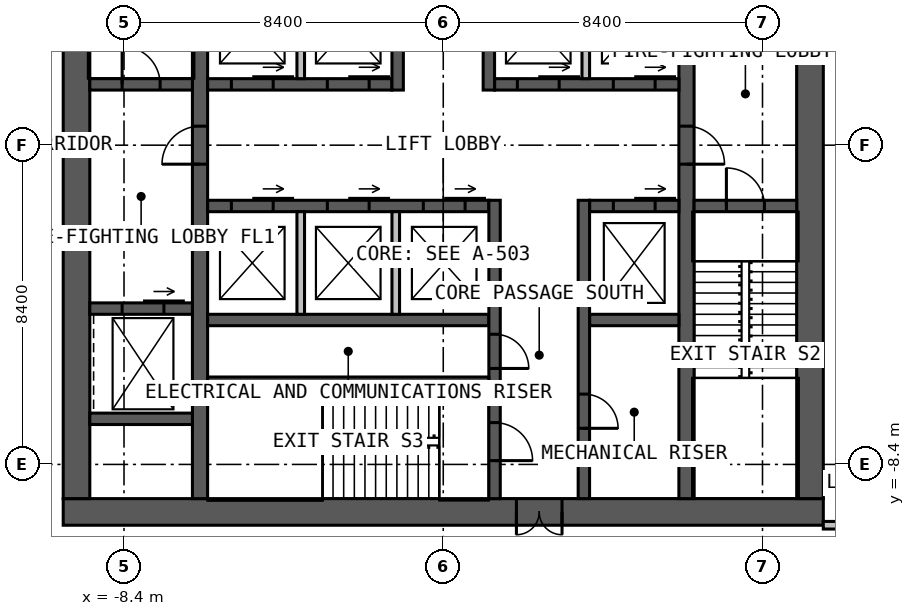
"""IFC4 building model, lengths in metres.
Left out: names, types, materials, properties, quantities, classifications, styles, units other than length and angle.
Written with IfcOpenShell. Run it as: python <this file> out.ifc"""

import sys

from ifc_helpers import new_model, si_unit, direction, frame, frame_2d, origin, place, context, subcontext, project, spatial, rectangle, extrude, element, fill, save


model = new_model("IFC4")
c1 = context("Model", 3, precision=1e-05, world=origin(), true_north=direction((0.0, 1.0)))
c2 = subcontext(c1, "Body", "Model", "MODEL_VIEW")
j1 = project(units=[si_unit("LENGTHUNIT", "METRE"), si_unit("PLANEANGLEUNIT", "RADIAN")], contexts=[c1])
p1 = place(None, origin())
s1 = spatial("IfcSite", under=j1, at=p1, CompositionType="ELEMENT")
p2 = place(p1, origin())
s2 = spatial("IfcBuilding", under=s1, at=p2, CompositionType="ELEMENT")
p3 = place(p2, frame((0.0, 0.0, 90.0)))
s3 = spatial("IfcBuildingStorey", under=s2, at=p3, CompositionType="ELEMENT", Elevation=90.0)
p4 = place(p3, frame((10.0, -9.65, 0.0), z_axis=(0.0, 0.0, 1.0), x_axis=(-1.0, 0.0, 0.0)))
e1 = element("IfcWall", 1, at=p4, inside=s3, PredefinedType="SOLIDWALL", context=c2, shape_type="SweptSolid", body=[
    extrude(rectangle(XDim=20.0, YDim=0.7, at=frame_2d((10.0, 0.0))), origin(), (0.0, 0.0, 1.0), 4.0),
])
p5 = place(p4, frame((6.875, 0.0, 0.0)))
e2 = element("IfcOpeningElement", 2, at=p5, cuts=e1, PredefinedType="OPENING", context=c2, shape_type="SweptSolid", body=[
    extrude(rectangle(XDim=1.2, YDim=2.2, at=frame_2d((0.6, 1.1))), frame((0.0, 0.36, 0.0), z_axis=(0.0, -1.0, 0.0), x_axis=(1.0, 0.0, 0.0)), (0.0, 0.0, 1.0), 0.72),
])
for number, where, z_axis, x_axis in (
    (3, (9.65, -9.3, 0.0), (0.0, 0.0, 1.0), (0.0, 1.0, 0.0)),
    (4, (-9.65, 9.3, 0.0), (0.0, 0.0, 1.0), (0.0, -1.0, 0.0)),
):
    element("IfcWall", number, at=place(p3, frame(where, z_axis=z_axis, x_axis=x_axis)), inside=s3, PredefinedType="SOLIDWALL", context=c2, shape_type="SweptSolid", body=[
        extrude(rectangle(XDim=18.6, YDim=0.7, at=frame_2d((9.3, 0.0))), origin(), (0.0, 0.0, 1.0), 4.0),
    ])
p6 = place(p3, frame((-6.4, -9.3, 0.0), z_axis=(0.0, 0.0, 1.0), x_axis=(0.0, 1.0, 0.0)))
e5 = element("IfcWall", 5, at=p6, inside=s3, PredefinedType="SOLIDWALL", context=c2, shape_type="SweptSolid", body=[
    extrude(rectangle(XDim=18.6, YDim=0.4, at=frame_2d((9.3, 0.0))), origin(), (0.0, 0.0, 1.0), 4.0),
])
p7 = place(p6, frame((8.8, 0.0, 0.0)))
e6 = element("IfcOpeningElement", 6, at=p7, cuts=e5, PredefinedType="OPENING", context=c2, shape_type="SweptSolid", body=[
    extrude(rectangle(XDim=1.0, YDim=2.2, at=frame_2d((0.5, 1.1))), frame((0.0, 0.21, 0.0), z_axis=(0.0, -1.0, 0.0), x_axis=(1.0, 0.0, 0.0)), (0.0, 0.0, 1.0), 0.42),
])
p8 = place(p3, frame((6.4, 9.3, 0.0), z_axis=(0.0, 0.0, 1.0), x_axis=(0.0, -1.0, 0.0)))
e7 = element("IfcWall", 7, at=p8, inside=s3, PredefinedType="SOLIDWALL", context=c2, shape_type="SweptSolid", body=[
    extrude(rectangle(XDim=18.6, YDim=0.4, at=frame_2d((9.3, 0.0))), origin(), (0.0, 0.0, 1.0), 4.0),
])
p9 = place(p8, frame((8.8, 0.0, 0.0)))
e8 = element("IfcOpeningElement", 8, at=p9, cuts=e7, PredefinedType="OPENING", context=c2, shape_type="SweptSolid", body=[
    extrude(rectangle(XDim=1.0, YDim=2.2, at=frame_2d((0.5, 1.1))), frame((0.0, 0.21, 0.0), z_axis=(0.0, -1.0, 0.0), x_axis=(1.0, 0.0, 0.0)), (0.0, 0.0, 1.0), 0.42),
])
p10 = place(p3, frame((-6.2, 1.6, 0.0), z_axis=(0.0, 0.0, 1.0), x_axis=(1.0, 0.0, 0.0)))
e9 = element("IfcWall", 9, at=p10, inside=s3, PredefinedType="SOLIDWALL", context=c2, shape_type="SweptSolid", body=[
    extrude(rectangle(XDim=4.85, YDim=0.3, at=frame_2d((2.425, 0.0))), origin(), (0.0, 0.0, 1.0), 4.0),
])
p11 = place(p10, frame((0.625, 0.0, 0.0)))
e10 = element("IfcOpeningElement", 10, at=p11, cuts=e9, PredefinedType="OPENING", context=c2, shape_type="SweptSolid", body=[
    extrude(rectangle(XDim=1.1, YDim=2.2, at=frame_2d((0.55, 1.1))), frame((0.0, 0.16, 0.0), z_axis=(0.0, -1.0, 0.0), x_axis=(1.0, 0.0, 0.0)), (0.0, 0.0, 1.0), 0.32),
])
p12 = place(p10, frame((3.15, 0.0, 0.0)))
e11 = element("IfcOpeningElement", 11, at=p12, cuts=e9, PredefinedType="OPENING", context=c2, shape_type="SweptSolid", body=[
    extrude(rectangle(XDim=1.1, YDim=2.2, at=frame_2d((0.55, 1.1))), frame((0.0, 0.16, 0.0), z_axis=(0.0, -1.0, 0.0), x_axis=(1.0, 0.0, 0.0)), (0.0, 0.0, 1.0), 0.32),
])
p13 = place(p3, frame((1.35, 1.6, 0.0), z_axis=(0.0, 0.0, 1.0), x_axis=(1.0, 0.0, 0.0)))
e12 = element("IfcWall", 12, at=p13, inside=s3, PredefinedType="SOLIDWALL", context=c2, shape_type="SweptSolid", body=[
    extrude(rectangle(XDim=4.85, YDim=0.3, at=frame_2d((2.425, 0.0))), origin(), (0.0, 0.0, 1.0), 4.0),
])
p14 = place(p13, frame((0.6, 0.0, 0.0)))
e13 = element("IfcOpeningElement", 13, at=p14, cuts=e12, PredefinedType="OPENING", context=c2, shape_type="SweptSolid", body=[
    extrude(rectangle(XDim=1.1, YDim=2.2, at=frame_2d((0.55, 1.1))), frame((0.0, 0.16, 0.0), z_axis=(0.0, -1.0, 0.0), x_axis=(1.0, 0.0, 0.0)), (0.0, 0.0, 1.0), 0.32),
])
p15 = place(p13, frame((3.125, 0.0, 0.0)))
e14 = element("IfcOpeningElement", 14, at=p15, cuts=e12, PredefinedType="OPENING", context=c2, shape_type="SweptSolid", body=[
    extrude(rectangle(XDim=1.1, YDim=2.2, at=frame_2d((0.55, 1.1))), frame((0.0, 0.16, 0.0), z_axis=(0.0, -1.0, 0.0), x_axis=(1.0, 0.0, 0.0)), (0.0, 0.0, 1.0), 0.32),
])
p16 = place(p3, frame((-1.2, 1.45, 0.0), z_axis=(0.0, 0.0, 1.0), x_axis=(0.0, 1.0, 0.0)))
e15 = element("IfcWall", 15, at=p16, inside=s3, PredefinedType="SOLIDWALL", context=c2, shape_type="SweptSolid", body=[
    extrude(rectangle(XDim=7.85, YDim=0.3, at=frame_2d((3.925, 0.0))), origin(), (0.0, 0.0, 1.0), 4.0),
])
p17 = place(p16, frame((5.05, 0.0, 0.0)))
e16 = element("IfcOpeningElement", 16, at=p17, cuts=e15, PredefinedType="OPENING", context=c2, shape_type="SweptSolid", body=[
    extrude(rectangle(XDim=1.0, YDim=2.2, at=frame_2d((0.5, 1.1))), frame((0.0, 0.16, 0.0), z_axis=(0.0, -1.0, 0.0), x_axis=(1.0, 0.0, 0.0)), (0.0, 0.0, 1.0), 0.32),
])
p18 = place(p3, frame((1.2, 1.45, 0.0), z_axis=(0.0, 0.0, 1.0), x_axis=(0.0, 1.0, 0.0)))
e17 = element("IfcWall", 17, at=p18, inside=s3, PredefinedType="SOLIDWALL", context=c2, shape_type="SweptSolid", body=[
    extrude(rectangle(XDim=7.85, YDim=0.3, at=frame_2d((3.925, 0.0))), origin(), (0.0, 0.0, 1.0), 4.0),
])
p19 = place(p18, frame((3.8, 0.0, 0.0)))
e18 = element("IfcOpeningElement", 18, at=p19, cuts=e17, PredefinedType="OPENING", context=c2, shape_type="SweptSolid", body=[
    extrude(rectangle(XDim=1.0, YDim=2.2, at=frame_2d((0.5, 1.1))), frame((0.0, 0.16, 0.0), z_axis=(0.0, -1.0, 0.0), x_axis=(1.0, 0.0, 0.0)), (0.0, 0.0, 1.0), 0.32),
])
p20 = place(p18, frame((6.15, 0.0, 0.0)))
e19 = element("IfcOpeningElement", 19, at=p20, cuts=e17, PredefinedType="OPENING", context=c2, shape_type="SweptSolid", body=[
    extrude(rectangle(XDim=1.0, YDim=2.2, at=frame_2d((0.5, 1.1))), frame((0.0, 0.16, 0.0), z_axis=(0.0, -1.0, 0.0), x_axis=(1.0, 0.0, 0.0)), (0.0, 0.0, 1.0), 0.32),
])
p21 = place(p3, frame((-6.2, -1.6, 0.0), z_axis=(0.0, 0.0, 1.0), x_axis=(1.0, 0.0, 0.0)))
e20 = element("IfcWall", 20, at=p21, inside=s3, PredefinedType="SOLIDWALL", context=c2, shape_type="SweptSolid", body=[
    extrude(rectangle(XDim=7.4, YDim=0.3, at=frame_2d((3.7, 0.0))), origin(), (0.0, 0.0, 1.0), 4.0),
])
p22 = place(p21, frame((0.625, 0.0, 0.0)))
e21 = element("IfcOpeningElement", 21, at=p22, cuts=e20, PredefinedType="OPENING", context=c2, shape_type="SweptSolid", body=[
    extrude(rectangle(XDim=1.1, YDim=2.2, at=frame_2d((0.55, 1.1))), frame((0.0, 0.16, 0.0), z_axis=(0.0, -1.0, 0.0), x_axis=(1.0, 0.0, 0.0)), (0.0, 0.0, 1.0), 0.32),
])
p23 = place(p21, frame((3.15, 0.0, 0.0)))
e22 = element("IfcOpeningElement", 22, at=p23, cuts=e20, PredefinedType="OPENING", context=c2, shape_type="SweptSolid", body=[
    extrude(rectangle(XDim=1.1, YDim=2.2, at=frame_2d((0.55, 1.1))), frame((0.0, 0.16, 0.0), z_axis=(0.0, -1.0, 0.0), x_axis=(1.0, 0.0, 0.0)), (0.0, 0.0, 1.0), 0.32),
])
p24 = place(p21, frame((5.675, 0.0, 0.0)))
e23 = element("IfcOpeningElement", 23, at=p24, cuts=e20, PredefinedType="OPENING", context=c2, shape_type="SweptSolid", body=[
    extrude(rectangle(XDim=1.1, YDim=2.2, at=frame_2d((0.55, 1.1))), frame((0.0, 0.16, 0.0), z_axis=(0.0, -1.0, 0.0), x_axis=(1.0, 0.0, 0.0)), (0.0, 0.0, 1.0), 0.32),
])
p25 = place(p3, frame((3.85, -1.6, 0.0), z_axis=(0.0, 0.0, 1.0), x_axis=(1.0, 0.0, 0.0)))
e24 = element("IfcWall", 24, at=p25, inside=s3, PredefinedType="SOLIDWALL", context=c2, shape_type="SweptSolid", body=[
    extrude(rectangle(XDim=2.35, YDim=0.3, at=frame_2d((1.175, 0.0))), origin(), (0.0, 0.0, 1.0), 4.0),
])
p26 = place(p25, frame((0.625, 0.0, 0.0)))
e25 = element("IfcOpeningElement", 25, at=p26, cuts=e24, PredefinedType="OPENING", context=c2, shape_type="SweptSolid", body=[
    extrude(rectangle(XDim=1.1, YDim=2.2, at=frame_2d((0.55, 1.1))), frame((0.0, 0.16, 0.0), z_axis=(0.0, -1.0, 0.0), x_axis=(1.0, 0.0, 0.0)), (0.0, 0.0, 1.0), 0.32),
])
p27 = place(p3, frame((-6.2, -4.6, 0.0), z_axis=(0.0, 0.0, 1.0), x_axis=(1.0, 0.0, 0.0)))
e26 = element("IfcWall", 26, at=p27, inside=s3, PredefinedType="SOLIDWALL", context=c2, shape_type="SweptSolid", body=[
    extrude(rectangle(XDim=7.4, YDim=0.3, at=frame_2d((3.7, 0.0))), origin(), (0.0, 0.0, 1.0), 4.0),
])
p28 = place(p3, frame((3.85, -4.6, 0.0), z_axis=(0.0, 0.0, 1.0), x_axis=(1.0, 0.0, 0.0)))
e27 = element("IfcWall", 27, at=p28, inside=s3, PredefinedType="SOLIDWALL", context=c2, shape_type="SweptSolid", body=[
    extrude(rectangle(XDim=2.35, YDim=0.3, at=frame_2d((1.175, 0.0))), origin(), (0.0, 0.0, 1.0), 4.0),
])
p29 = place(p3, frame((1.35, -1.45, 0.0), z_axis=(0.0, 0.0, 1.0), x_axis=(0.0, -1.0, 0.0)))
e28 = element("IfcWall", 28, at=p29, inside=s3, PredefinedType="SOLIDWALL", context=c2, shape_type="SweptSolid", body=[
    extrude(rectangle(XDim=7.85, YDim=0.3, at=frame_2d((3.925, 0.0))), origin(), (0.0, 0.0, 1.0), 4.0),
])
p30 = place(p29, frame((5.85, 0.0, 0.0)))
e29 = element("IfcOpeningElement", 29, at=p30, cuts=e28, PredefinedType="OPENING", context=c2, shape_type="SweptSolid", body=[
    extrude(rectangle(XDim=1.0, YDim=2.2, at=frame_2d((0.5, 1.1))), frame((0.0, 0.16, 0.0), z_axis=(0.0, -1.0, 0.0), x_axis=(1.0, 0.0, 0.0)), (0.0, 0.0, 1.0), 0.32),
])
p31 = place(p29, frame((3.525, 0.0, 0.0)))
e30 = element("IfcOpeningElement", 30, at=p31, cuts=e28, PredefinedType="OPENING", context=c2, shape_type="SweptSolid", body=[
    extrude(rectangle(XDim=0.9, YDim=2.2, at=frame_2d((0.45, 1.1))), frame((0.0, 0.16, 0.0), z_axis=(0.0, -1.0, 0.0), x_axis=(1.0, 0.0, 0.0)), (0.0, 0.0, 1.0), 0.32),
])
p32 = place(p3, frame((3.7, -1.45, 0.0), z_axis=(0.0, 0.0, 1.0), x_axis=(0.0, -1.0, 0.0)))
e31 = element("IfcWall", 31, at=p32, inside=s3, PredefinedType="SOLIDWALL", context=c2, shape_type="SweptSolid", body=[
    extrude(rectangle(XDim=7.85, YDim=0.3, at=frame_2d((3.925, 0.0))), origin(), (0.0, 0.0, 1.0), 4.0),
])
p33 = place(p32, frame((5.1, 0.0, 0.0)))
e32 = element("IfcOpeningElement", 32, at=p33, cuts=e31, PredefinedType="OPENING", context=c2, shape_type="SweptSolid", body=[
    extrude(rectangle(XDim=0.9, YDim=2.2, at=frame_2d((0.45, 1.1))), frame((0.0, 0.16, 0.0), z_axis=(0.0, -1.0, 0.0), x_axis=(1.0, 0.0, 0.0)), (0.0, 0.0, 1.0), 0.32),
])
p34 = place(p3, frame((-6.2, -6.2, 0.0), z_axis=(0.0, 0.0, 1.0), x_axis=(1.0, 0.0, 0.0)))
e33 = element("IfcWall", 33, at=p34, inside=s3, PredefinedType="SOLIDWALL", context=c2, shape_type="SweptSolid", body=[
    extrude(rectangle(XDim=7.4, YDim=0.2, at=frame_2d((3.7, 0.0))), origin(), (0.0, 0.0, 1.0), 4.0),
])
p35 = place(p3, frame((-9.3, 1.6, 0.0), z_axis=(0.0, 0.0, 1.0), x_axis=(1.0, 0.0, 0.0)))
e34 = element("IfcWall", 34, at=p35, inside=s3, PredefinedType="SOLIDWALL", context=c2, shape_type="SweptSolid", body=[
    extrude(rectangle(XDim=2.7, YDim=0.3, at=frame_2d((1.35, 0.0))), origin(), (0.0, 0.0, 1.0), 4.0),
])
p36 = place(p35, frame((0.85, 0.0, 0.0)))
e35 = element("IfcOpeningElement", 35, at=p36, cuts=e34, PredefinedType="OPENING", context=c2, shape_type="SweptSolid", body=[
    extrude(rectangle(XDim=1.0, YDim=2.2, at=frame_2d((0.5, 1.1))), frame((0.0, 0.16, 0.0), z_axis=(0.0, -1.0, 0.0), x_axis=(1.0, 0.0, 0.0)), (0.0, 0.0, 1.0), 0.32),
])
p37 = place(p3, frame((6.6, -1.6, 0.0), z_axis=(0.0, 0.0, 1.0), x_axis=(1.0, 0.0, 0.0)))
e36 = element("IfcWall", 36, at=p37, inside=s3, PredefinedType="SOLIDWALL", context=c2, shape_type="SweptSolid", body=[
    extrude(rectangle(XDim=2.7, YDim=0.3, at=frame_2d((1.35, 0.0))), origin(), (0.0, 0.0, 1.0), 4.0),
])
p38 = place(p37, frame((0.85, 0.0, 0.0)))
e37 = element("IfcOpeningElement", 37, at=p38, cuts=e36, PredefinedType="OPENING", context=c2, shape_type="SweptSolid", body=[
    extrude(rectangle(XDim=1.0, YDim=2.2, at=frame_2d((0.5, 1.1))), frame((0.0, 0.16, 0.0), z_axis=(0.0, -1.0, 0.0), x_axis=(1.0, 0.0, 0.0)), (0.0, 0.0, 1.0), 0.32),
])
p39 = place(p3, frame((-9.3, -4.3, 0.0), z_axis=(0.0, 0.0, 1.0), x_axis=(1.0, 0.0, 0.0)))
e38 = element("IfcWall", 38, at=p39, inside=s3, PredefinedType="SOLIDWALL", context=c2, shape_type="SweptSolid", body=[
    extrude(rectangle(XDim=2.7, YDim=0.3, at=frame_2d((1.35, 0.0))), origin(), (0.0, 0.0, 1.0), 4.0),
])
p40 = place(p39, frame((0.85, 0.0, 0.0)))
e39 = element("IfcOpeningElement", 39, at=p40, cuts=e38, PredefinedType="OPENING", context=c2, shape_type="SweptSolid", body=[
    extrude(rectangle(XDim=1.1, YDim=2.2, at=frame_2d((0.55, 1.1))), frame((0.0, 0.16, 0.0), z_axis=(0.0, -1.0, 0.0), x_axis=(1.0, 0.0, 0.0)), (0.0, 0.0, 1.0), 0.32),
])
p41 = place(p3, frame((-9.3, -7.2, 0.0), z_axis=(0.0, 0.0, 1.0), x_axis=(1.0, 0.0, 0.0)))
e40 = element("IfcWall", 40, at=p41, inside=s3, PredefinedType="SOLIDWALL", context=c2, shape_type="SweptSolid", body=[
    extrude(rectangle(XDim=2.7, YDim=0.3, at=frame_2d((1.35, 0.0))), origin(), (0.0, 0.0, 1.0), 4.0),
])
for number, where, z_axis, x_axis in (
    (41, (-3.75, 1.75, 0.0), (0.0, 0.0, 1.0), (0.0, 1.0, 0.0)),
    (42, (3.75, 1.75, 0.0), (0.0, 0.0, 1.0), (0.0, 1.0, 0.0)),
    (43, (-3.75, -1.75, 0.0), (0.0, 0.0, 1.0), (0.0, -1.0, 0.0)),
    (44, (-1.25, -1.75, 0.0), (0.0, 0.0, 1.0), (0.0, -1.0, 0.0)),
):
    element("IfcWall", number, at=place(p3, frame(where, z_axis=z_axis, x_axis=x_axis)), inside=s3, PredefinedType="SOLIDWALL", context=c2, shape_type="SweptSolid", body=[
        extrude(rectangle(XDim=2.7, YDim=0.2, at=frame_2d((1.35, 0.0))), origin(), (0.0, 0.0, 1.0), 3.75),
    ])
p42 = place(p3, frame((10.0, -10.0, 0.0), z_axis=(0.0, 0.0, 1.0), x_axis=(1.0, 0.0, 0.0)))
e45 = element("IfcWall", 45, at=p42, inside=s3, PredefinedType="PARTITIONING", context=c2, shape_type="SweptSolid", body=[
    extrude(rectangle(XDim=2.0, YDim=0.2, at=frame_2d((1.0, 0.0))), origin(), (0.0, 0.0, 1.0), 3.8),
])
p43 = place(p42, frame((0.5, 0.0, 0.0)))
e46 = element("IfcOpeningElement", 46, at=p43, cuts=e45, PredefinedType="OPENING", context=c2, shape_type="SweptSolid", body=[
    extrude(rectangle(XDim=1.0, YDim=2.2, at=frame_2d((0.5, 1.1))), frame((0.0, 0.11, 0.0), z_axis=(0.0, -1.0, 0.0), x_axis=(1.0, 0.0, 0.0)), (0.0, 0.0, 1.0), 0.22),
])
p44 = place(p5, origin())
e47 = element("IfcDoor", 47, at=p44, inside=s3, OperationType="DOUBLE_DOOR_SINGLE_SWING", PredefinedType="DOOR", context=c2, shape_type="SweptSolid", body=[
    extrude(rectangle(XDim=1.2, YDim=2.2, at=frame_2d((0.6, 1.1))), frame((0.0, 0.025, 0.0), z_axis=(0.0, -1.0, 0.0), x_axis=(1.0, 0.0, 0.0)), (0.0, 0.0, 1.0), 0.05),
])
fill(e2, e47)
p45 = place(p7, origin())
e48 = element("IfcDoor", 48, at=p45, inside=s3, OperationType="SINGLE_SWING_LEFT", PredefinedType="DOOR", context=c2, shape_type="SweptSolid", body=[
    extrude(rectangle(XDim=1.0, YDim=2.2, at=frame_2d((0.5, 1.1))), frame((0.0, 0.025, 0.0), z_axis=(0.0, -1.0, 0.0), x_axis=(1.0, 0.0, 0.0)), (0.0, 0.0, 1.0), 0.05),
])
fill(e6, e48)
p46 = place(p9, origin())
e49 = element("IfcDoor", 49, at=p46, inside=s3, OperationType="SINGLE_SWING_RIGHT", PredefinedType="DOOR", context=c2, shape_type="SweptSolid", body=[
    extrude(rectangle(XDim=1.0, YDim=2.2, at=frame_2d((0.5, 1.1))), frame((0.0, 0.025, 0.0), z_axis=(0.0, -1.0, 0.0), x_axis=(1.0, 0.0, 0.0)), (0.0, 0.0, 1.0), 0.05),
])
fill(e8, e49)
p47 = place(p36, origin())
e50 = element("IfcDoor", 50, at=p47, inside=s3, OperationType="SINGLE_SWING_LEFT", PredefinedType="DOOR", context=c2, shape_type="SweptSolid", body=[
    extrude(rectangle(XDim=1.0, YDim=2.2, at=frame_2d((0.5, 1.1))), frame((0.0, 0.025, 0.0), z_axis=(0.0, -1.0, 0.0), x_axis=(1.0, 0.0, 0.0)), (0.0, 0.0, 1.0), 0.05),
])
fill(e35, e50)
p48 = place(p38, origin())
e51 = element("IfcDoor", 51, at=p48, inside=s3, OperationType="SINGLE_SWING_LEFT", PredefinedType="DOOR", context=c2, shape_type="SweptSolid", body=[
    extrude(rectangle(XDim=1.0, YDim=2.2, at=frame_2d((0.5, 1.1))), frame((0.0, 0.025, 0.0), z_axis=(0.0, -1.0, 0.0), x_axis=(1.0, 0.0, 0.0)), (0.0, 0.0, 1.0), 0.05),
])
fill(e37, e51)
p49 = place(p30, origin())
e52 = element("IfcDoor", 52, at=p49, inside=s3, OperationType="SINGLE_SWING_RIGHT", PredefinedType="DOOR", context=c2, shape_type="SweptSolid", body=[
    extrude(rectangle(XDim=1.0, YDim=2.2, at=frame_2d((0.5, 1.1))), frame((0.0, 0.025, 0.0), z_axis=(0.0, -1.0, 0.0), x_axis=(1.0, 0.0, 0.0)), (0.0, 0.0, 1.0), 0.05),
])
fill(e29, e52)
p50 = place(p31, origin())
e53 = element("IfcDoor", 53, at=p50, inside=s3, OperationType="SINGLE_SWING_RIGHT", PredefinedType="DOOR", context=c2, shape_type="SweptSolid", body=[
    extrude(rectangle(XDim=0.9, YDim=2.2, at=frame_2d((0.45, 1.1))), frame((0.0, 0.025, 0.0), z_axis=(0.0, -1.0, 0.0), x_axis=(1.0, 0.0, 0.0)), (0.0, 0.0, 1.0), 0.05),
])
fill(e30, e53)
p51 = place(p33, origin())
e54 = element("IfcDoor", 54, at=p51, inside=s3, OperationType="SINGLE_SWING_RIGHT", PredefinedType="DOOR", context=c2, shape_type="SweptSolid", body=[
    extrude(rectangle(XDim=0.9, YDim=2.2, at=frame_2d((0.45, 1.1))), frame((0.0, 0.025, 0.0), z_axis=(0.0, -1.0, 0.0), x_axis=(1.0, 0.0, 0.0)), (0.0, 0.0, 1.0), 0.05),
])
fill(e32, e54)
p52 = place(p11, origin())
e55 = element("IfcDoor", 55, at=p52, inside=s3, OperationType="SLIDING_TO_LEFT", PredefinedType="DOOR", context=c2, shape_type="SweptSolid", body=[
    extrude(rectangle(XDim=1.1, YDim=2.2, at=frame_2d((0.55, 1.1))), frame((0.0, 0.025, 0.0), z_axis=(0.0, -1.0, 0.0), x_axis=(1.0, 0.0, 0.0)), (0.0, 0.0, 1.0), 0.05),
])
fill(e10, e55)
p53 = place(p12, origin())
e56 = element("IfcDoor", 56, at=p53, inside=s3, OperationType="SLIDING_TO_LEFT", PredefinedType="DOOR", context=c2, shape_type="SweptSolid", body=[
    extrude(rectangle(XDim=1.1, YDim=2.2, at=frame_2d((0.55, 1.1))), frame((0.0, 0.025, 0.0), z_axis=(0.0, -1.0, 0.0), x_axis=(1.0, 0.0, 0.0)), (0.0, 0.0, 1.0), 0.05),
])
fill(e11, e56)
p54 = place(p14, origin())
e57 = element("IfcDoor", 57, at=p54, inside=s3, OperationType="SLIDING_TO_LEFT", PredefinedType="DOOR", context=c2, shape_type="SweptSolid", body=[
    extrude(rectangle(XDim=1.1, YDim=2.2, at=frame_2d((0.55, 1.1))), frame((0.0, 0.025, 0.0), z_axis=(0.0, -1.0, 0.0), x_axis=(1.0, 0.0, 0.0)), (0.0, 0.0, 1.0), 0.05),
])
fill(e13, e57)
p55 = place(p15, origin())
e58 = element("IfcDoor", 58, at=p55, inside=s3, OperationType="SLIDING_TO_LEFT", PredefinedType="DOOR", context=c2, shape_type="SweptSolid", body=[
    extrude(rectangle(XDim=1.1, YDim=2.2, at=frame_2d((0.55, 1.1))), frame((0.0, 0.025, 0.0), z_axis=(0.0, -1.0, 0.0), x_axis=(1.0, 0.0, 0.0)), (0.0, 0.0, 1.0), 0.05),
])
fill(e14, e58)
p56 = place(p22, origin())
e59 = element("IfcDoor", 59, at=p56, inside=s3, OperationType="SLIDING_TO_LEFT", PredefinedType="DOOR", context=c2, shape_type="SweptSolid", body=[
    extrude(rectangle(XDim=1.1, YDim=2.2, at=frame_2d((0.55, 1.1))), frame((0.0, 0.025, 0.0), z_axis=(0.0, -1.0, 0.0), x_axis=(1.0, 0.0, 0.0)), (0.0, 0.0, 1.0), 0.05),
])
fill(e21, e59)
p57 = place(p23, origin())
e60 = element("IfcDoor", 60, at=p57, inside=s3, OperationType="SLIDING_TO_LEFT", PredefinedType="DOOR", context=c2, shape_type="SweptSolid", body=[
    extrude(rectangle(XDim=1.1, YDim=2.2, at=frame_2d((0.55, 1.1))), frame((0.0, 0.025, 0.0), z_axis=(0.0, -1.0, 0.0), x_axis=(1.0, 0.0, 0.0)), (0.0, 0.0, 1.0), 0.05),
])
fill(e22, e60)
p58 = place(p24, origin())
e61 = element("IfcDoor", 61, at=p58, inside=s3, OperationType="SLIDING_TO_LEFT", PredefinedType="DOOR", context=c2, shape_type="SweptSolid", body=[
    extrude(rectangle(XDim=1.1, YDim=2.2, at=frame_2d((0.55, 1.1))), frame((0.0, 0.025, 0.0), z_axis=(0.0, -1.0, 0.0), x_axis=(1.0, 0.0, 0.0)), (0.0, 0.0, 1.0), 0.05),
])
fill(e23, e61)
p59 = place(p26, origin())
e62 = element("IfcDoor", 62, at=p59, inside=s3, OperationType="SLIDING_TO_LEFT", PredefinedType="DOOR", context=c2, shape_type="SweptSolid", body=[
    extrude(rectangle(XDim=1.1, YDim=2.2, at=frame_2d((0.55, 1.1))), frame((0.0, 0.025, 0.0), z_axis=(0.0, -1.0, 0.0), x_axis=(1.0, 0.0, 0.0)), (0.0, 0.0, 1.0), 0.05),
])
fill(e25, e62)
p60 = place(p40, origin())
e63 = element("IfcDoor", 63, at=p60, inside=s3, OperationType="SLIDING_TO_LEFT", PredefinedType="DOOR", context=c2, shape_type="SweptSolid", body=[
    extrude(rectangle(XDim=1.1, YDim=2.2, at=frame_2d((0.55, 1.1))), frame((0.0, 0.025, 0.0), z_axis=(0.0, -1.0, 0.0), x_axis=(1.0, 0.0, 0.0)), (0.0, 0.0, 1.0), 0.05),
])
fill(e39, e63)
save(model, sys.argv[1])
